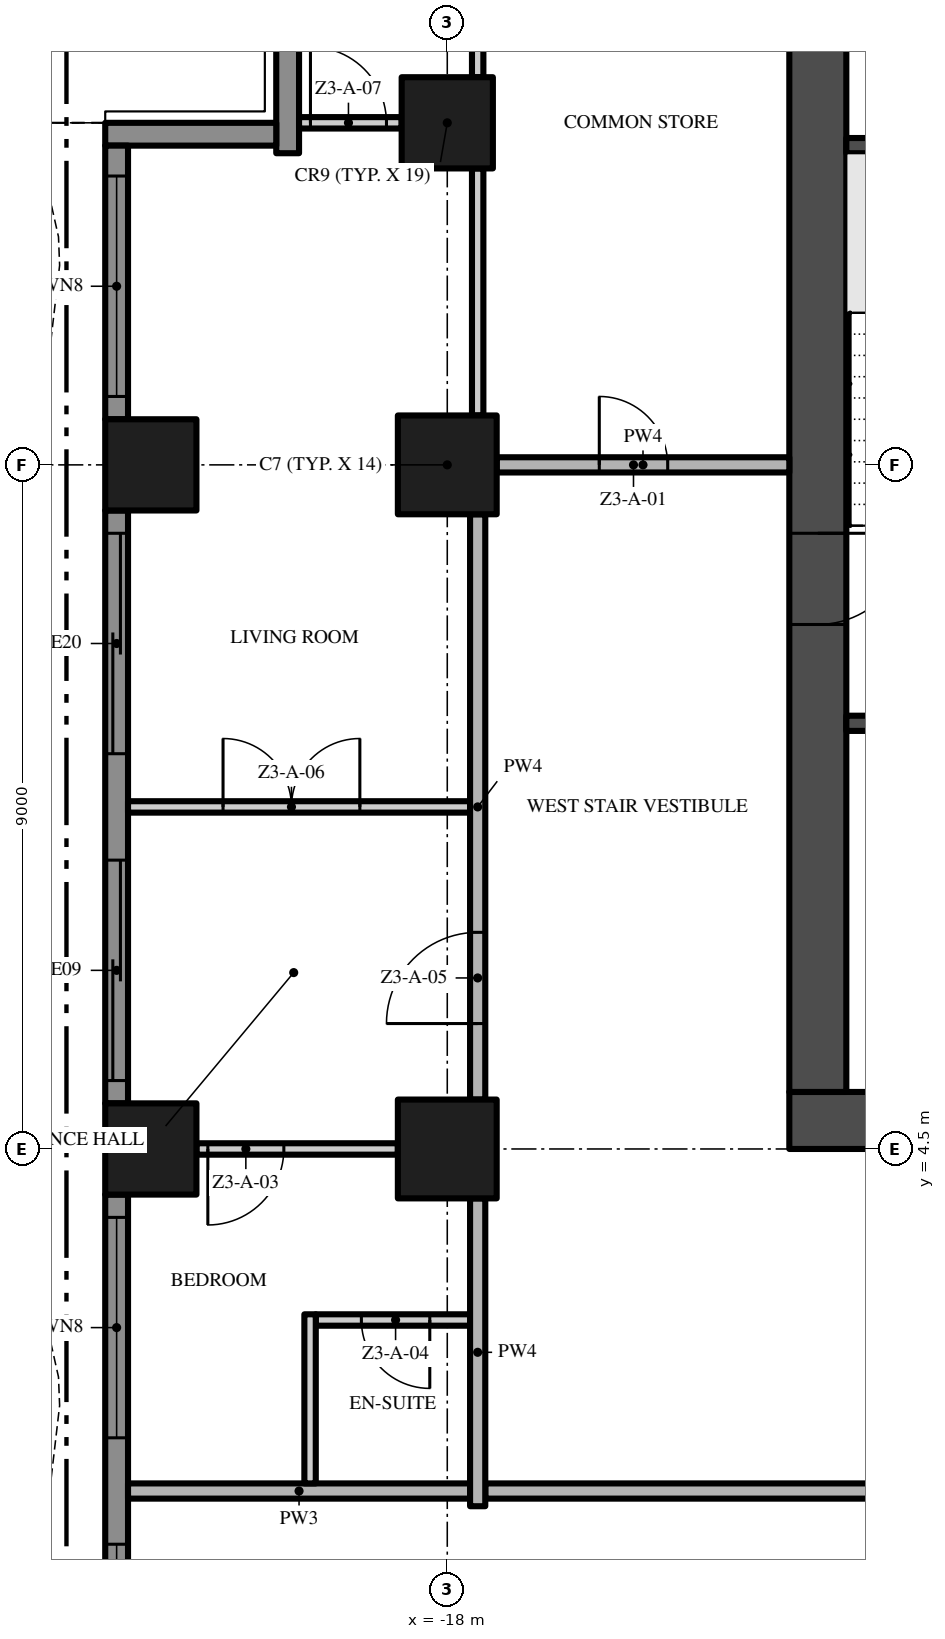
"""IFC4 building model, lengths in metres.
Left out: names, types, materials, properties, quantities, classifications, styles, units other than length and angle.
Written with IfcOpenShell. Run it as: python <this file> out.ifc"""

import sys

from ifc_helpers import new_model, si_unit, direction, frame, frame_2d, origin, origin_2d, place, context, subcontext, project, spatial, polyline, rectangle, outline, extrude, element, fill, save


model = new_model("IFC4")
c1 = context("Model", 3, precision=1e-05, world=origin(), true_north=direction((0.0, 1.0)))
c2 = subcontext(c1, "Body", "Model", "MODEL_VIEW")
j1 = project(units=[si_unit("LENGTHUNIT", "METRE"), si_unit("PLANEANGLEUNIT", "RADIAN")], contexts=[c1])
p1 = place(None, origin())
s1 = spatial("IfcSite", under=j1, at=p1, CompositionType="ELEMENT")
p2 = place(p1, origin())
s2 = spatial("IfcBuilding", under=s1, at=p2, CompositionType="ELEMENT")
p3 = place(p2, frame((0.0, 0.0, 132.6)))
s3 = spatial("IfcBuildingStorey", under=s2, at=p3, CompositionType="ELEMENT", Elevation=132.6)
p4 = place(p3, frame((-13.5, 4.875, -0.3), z_axis=(0.0, 0.0, 1.0), x_axis=(1.0, 0.0, 0.0)))
e1 = element("IfcWall", 1, at=p4, inside=s3, PredefinedType="SHEAR", context=c2, shape_type="SweptSolid", body=[
    extrude(rectangle(XDim=27.0, YDim=0.75, at=frame_2d((13.5, 0.0))), origin(), (0.0, 0.0, 1.0), 3.8),
])
p5 = place(p4, frame((12.0, 0.0, 0.3)))
e2 = element("IfcOpeningElement", 2, at=p5, cuts=e1, PredefinedType="OPENING", context=c2, shape_type="SweptSolid", body=[
    extrude(rectangle(XDim=3.0, YDim=2.4, at=frame_2d((1.5, 1.2))), frame((0.0, 0.385, 0.0), z_axis=(0.0, -1.0, 0.0), x_axis=(1.0, 0.0, 0.0)), (0.0, 0.0, 1.0), 0.77),
])
p6 = place(p4, frame((4.9, 0.0, 0.3)))
e3 = element("IfcOpeningElement", 3, at=p6, cuts=e1, PredefinedType="OPENING", context=c2, shape_type="SweptSolid", body=[
    extrude(rectangle(XDim=1.2, YDim=2.2, at=frame_2d((0.6, 1.1))), frame((0.0, 0.385, 0.0), z_axis=(0.0, -1.0, 0.0), x_axis=(1.0, 0.0, 0.0)), (0.0, 0.0, 1.0), 0.77),
])
p7 = place(p4, frame((20.75, 0.0, 0.3)))
e4 = element("IfcOpeningElement", 4, at=p7, cuts=e1, PredefinedType="OPENING", context=c2, shape_type="SweptSolid", body=[
    extrude(rectangle(XDim=1.5, YDim=2.2, at=frame_2d((0.75, 1.1))), frame((0.0, 0.385, 0.0), z_axis=(0.0, -1.0, 0.0), x_axis=(1.0, 0.0, 0.0)), (0.0, 0.0, 1.0), 0.77),
])
p8 = place(p4, frame((17.4, 0.0, 0.3)))
e5 = element("IfcOpeningElement", 5, at=p8, cuts=e1, PredefinedType="OPENING", context=c2, shape_type="SweptSolid", body=[
    extrude(rectangle(XDim=1.2, YDim=2.2, at=frame_2d((0.6, 1.1))), frame((0.0, 0.385, 0.0), z_axis=(0.0, -1.0, 0.0), x_axis=(1.0, 0.0, 0.0)), (0.0, 0.0, 1.0), 0.77),
])
p9 = place(p3, frame((-13.125, 21.75, -0.3), z_axis=(0.0, 0.0, 1.0), x_axis=(0.0, -1.0, 0.0)))
e6 = element("IfcWall", 6, at=p9, inside=s3, PredefinedType="SHEAR", context=c2, shape_type="SweptSolid", body=[
    extrude(rectangle(XDim=16.5, YDim=0.75, at=frame_2d((8.25, 0.0))), origin(), (0.0, 0.0, 1.0), 3.8),
])
p10 = place(p9, frame((9.15, 0.0, 0.3)))
e7 = element("IfcOpeningElement", 7, at=p10, cuts=e6, PredefinedType="OPENING", context=c2, shape_type="SweptSolid", body=[
    extrude(rectangle(XDim=1.2, YDim=2.2, at=frame_2d((0.6, 1.1))), frame((0.0, 0.385, 0.0), z_axis=(0.0, -1.0, 0.0), x_axis=(1.0, 0.0, 0.0)), (0.0, 0.0, 1.0), 0.77),
])
for number, where, z_axis, x_axis in (
    (8, (-18.0, 13.5, 0.0), (0.0, 0.0, 1.0), (1.0, 0.0, 0.0)),
    (9, (-18.0, 4.5, 0.0), (0.0, 0.0, 1.0), (1.0, 0.0, 0.0)),
):
    element("IfcColumn", number, at=place(p3, frame(where, z_axis=z_axis, x_axis=x_axis)), inside=s3, PredefinedType="COLUMN", context=c2, shape_type="SweptSolid", body=[
        extrude(rectangle(XDim=1.3, YDim=1.3, at=origin_2d()), origin(), (0.0, 0.0, 1.0), 3.5),
    ])
for number, where, z_axis, x_axis in (
    (10, (-21.9, 13.5, 0.0), (0.0, 0.0, 1.0), (1.0, 0.0, 0.0)),
    (11, (-18.0, 18.0, 0.0), (0.0, 0.0, 1.0), (1.0, 0.0, 0.0)),
    (12, (-21.9, 4.5, 0.0), (0.0, 0.0, 1.0), (1.0, 0.0, 0.0)),
):
    element("IfcColumn", number, at=place(p3, frame(where, z_axis=z_axis, x_axis=x_axis)), inside=s3, PredefinedType="COLUMN", context=c2, shape_type="SweptSolid", body=[
        extrude(rectangle(XDim=1.2, YDim=1.2, at=origin_2d()), origin(), (0.0, 0.0, 1.0), 3.5),
    ])
p11 = place(p3, frame((-20.1, 17.6, 0.0), z_axis=(0.0, 0.0, 1.0), x_axis=(0.0, 1.0, 0.0)))
e13 = element("IfcWall", 13, at=p11, inside=s3, PredefinedType="SOLIDWALL", context=c2, shape_type="SweptSolid", body=[
    extrude(rectangle(XDim=2.35, YDim=0.3, at=frame_2d((1.175, 0.0))), origin(), (0.0, 0.0, 1.0), 3.5),
])
p12 = place(p3, frame((-22.5, 17.85, 0.0), z_axis=(0.0, 0.0, 1.0), x_axis=(1.0, 0.0, 0.0)))
e14 = element("IfcWall", 14, at=p12, inside=s3, PredefinedType="SOLIDWALL", context=c2, shape_type="SweptSolid", body=[
    extrude(rectangle(XDim=2.25, YDim=0.3, at=frame_2d((1.125, 0.0))), origin(), (0.0, 0.0, 1.0), 3.5),
])
p13 = place(p3, frame((-22.35, 14.1, 0.0), z_axis=(0.0, 0.0, 1.0), x_axis=(0.0, 1.0, 0.0)))
e15 = element("IfcWall", 15, at=p13, inside=s3, PredefinedType="SOLIDWALL", context=c2, shape_type="SweptSolid", body=[
    extrude(rectangle(XDim=3.6, YDim=0.3, at=frame_2d((1.8, 0.0))), origin(), (0.0, 0.0, 1.0), 3.5),
])
p14 = place(p13, frame((0.3, 0.0, 0.45)))
e16 = element("IfcOpeningElement", 16, at=p14, cuts=e15, PredefinedType="OPENING", context=c2, shape_type="SweptSolid", body=[
    extrude(rectangle(XDim=2.9, YDim=2.65, at=frame_2d((1.45, 1.325))), frame((0.0, 0.16, 0.0), z_axis=(0.0, -1.0, 0.0), x_axis=(1.0, 0.0, 0.0)), (0.0, 0.0, 1.0), 0.32),
])
p15 = place(p3, frame((-22.35, 5.1, 0.0), z_axis=(0.0, 0.0, 1.0), x_axis=(0.0, 1.0, 0.0)))
e17 = element("IfcWall", 17, at=p15, inside=s3, PredefinedType="SOLIDWALL", context=c2, shape_type="SweptSolid", body=[
    extrude(rectangle(XDim=7.8, YDim=0.3, at=frame_2d((3.9, 0.0))), origin(), (0.0, 0.0, 1.0), 3.5),
])
p16 = place(p15, frame((4.6, 0.0, 0.0)))
e18 = element("IfcOpeningElement", 18, at=p16, cuts=e17, PredefinedType="OPENING", context=c2, shape_type="SweptSolid", body=[
    extrude(rectangle(XDim=2.9, YDim=2.4, at=frame_2d((1.45, 1.2))), frame((0.0, 0.16, 0.0), z_axis=(0.0, -1.0, 0.0), x_axis=(1.0, 0.0, 0.0)), (0.0, 0.0, 1.0), 0.32),
])
p17 = place(p15, frame((0.3, 0.0, 0.0)))
e19 = element("IfcOpeningElement", 19, at=p17, cuts=e17, PredefinedType="OPENING", context=c2, shape_type="SweptSolid", body=[
    extrude(rectangle(XDim=2.9, YDim=2.4, at=frame_2d((1.45, 1.2))), frame((0.0, 0.16, 0.0), z_axis=(0.0, -1.0, 0.0), x_axis=(1.0, 0.0, 0.0)), (0.0, 0.0, 1.0), 0.32),
])
p18 = place(p3, frame((-22.35, -3.9, 0.0), z_axis=(0.0, 0.0, 1.0), x_axis=(0.0, 1.0, 0.0)))
e20 = element("IfcWall", 20, at=p18, inside=s3, PredefinedType="SOLIDWALL", context=c2, shape_type="SweptSolid", body=[
    extrude(rectangle(XDim=7.8, YDim=0.3, at=frame_2d((3.9, 0.0))), origin(), (0.0, 0.0, 1.0), 3.5),
])
p19 = place(p18, frame((4.6, 0.0, 0.45)))
e21 = element("IfcOpeningElement", 21, at=p19, cuts=e20, PredefinedType="OPENING", context=c2, shape_type="SweptSolid", body=[
    extrude(rectangle(XDim=2.9, YDim=2.65, at=frame_2d((1.45, 1.325))), frame((0.0, 0.16, 0.0), z_axis=(0.0, -1.0, 0.0), x_axis=(1.0, 0.0, 0.0)), (0.0, 0.0, 1.0), 0.32),
])
p20 = place(p18, frame((0.3, 0.0, 0.45)))
e22 = element("IfcOpeningElement", 22, at=p20, cuts=e20, PredefinedType="OPENING", context=c2, shape_type="SweptSolid", body=[
    extrude(rectangle(XDim=2.9, YDim=2.65, at=frame_2d((1.45, 1.325))), frame((0.0, 0.16, 0.0), z_axis=(0.0, -1.0, 0.0), x_axis=(1.0, 0.0, 0.0)), (0.0, 0.0, 1.0), 0.32),
])
p21 = place(p3, origin())
e23 = element("IfcWall", 23, at=p21, inside=s3, PredefinedType="USERDEFINED", context=c2, shape_type="SweptSolid", body=[
    extrude(outline(polyline([(-23.451, 18.0), (-23.115, 16.5), (-23.1, 16.125), (-23.231, 15.0), (-23.755, 13.5), (-24.488, 12.0), (-25.149, 10.5), (-25.485, 9.0), (-25.5, 8.625), (-25.369, 7.5), (-24.845, 6.0), (-24.112, 4.5), (-23.451, 3.0), (-23.115, 1.5), (-23.1, 1.125), (-23.231, 0.0), (-23.755, -1.5), (-24.488, -3.0), (-25.149, -4.5), (-25.485, -6.0), (-25.5, -6.375), (-25.369, -7.5), (-24.845, -9.0), (-24.112, -10.5), (-23.451, -12.0), (-23.115, -13.5), (-22.871, -13.445), (-23.213, -11.921), (-23.885, -10.395), (-24.614, -8.904), (-25.124, -7.444), (-25.249, -6.365), (-25.236, -6.033), (-24.91, -4.579), (-24.261, -3.105), (-23.524, -1.596), (-22.986, -0.056), (-22.849, 1.115), (-22.866, 1.533), (-23.213, 3.079), (-23.885, 4.605), (-24.614, 6.096), (-25.124, 7.556), (-25.249, 8.635), (-25.236, 8.967), (-24.91, 10.421), (-24.261, 11.895), (-23.524, 13.404), (-22.986, 14.944), (-22.849, 16.115), (-22.866, 16.533), (-23.208, 18.055), (-23.451, 18.0)])), origin(), (0.0, 0.0, 1.0), 0.9),
])
for number, where, z_axis, x_axis in (
    (24, (-12.75, 10.1, 0.0), (0.0, 0.0, 1.0), (1.0, 0.0, 0.0)),
    (25, (-12.75, 17.7, 0.0), (0.0, 0.0, 1.0), (1.0, 0.0, 0.0)),
):
    element("IfcWall", number, at=place(p3, frame(where, z_axis=z_axis, x_axis=x_axis)), inside=s3, PredefinedType="SHEAR", context=c2, shape_type="SweptSolid", body=[
        extrude(rectangle(XDim=3.1, YDim=0.2, at=frame_2d((1.55, 0.0))), origin(), (0.0, 0.0, 1.0), 3.5),
    ])
p22 = place(p3, frame((17.5, 0.0, 0.0), z_axis=(0.0, 0.0, 1.0), x_axis=(-1.0, 0.0, 0.0)))
e26 = element("IfcWall", 26, at=p22, inside=s3, PredefinedType="PARTITIONING", context=c2, shape_type="SweptSolid", body=[
    extrude(rectangle(XDim=35.0, YDim=0.2, at=frame_2d((17.5, 0.0))), origin(), (0.0, 0.0, 1.0), 3.5),
])
p23 = place(p22, frame((16.75, 0.0, 0.0)))
e27 = element("IfcOpeningElement", 27, at=p23, cuts=e26, PredefinedType="OPENING", context=c2, shape_type="SweptSolid", body=[
    extrude(rectangle(XDim=1.5, YDim=2.4, at=frame_2d((0.75, 1.2))), frame((0.0, 0.11, 0.0), z_axis=(0.0, -1.0, 0.0), x_axis=(1.0, 0.0, 0.0)), (0.0, 0.0, 1.0), 0.22),
])
p24 = place(p3, frame((-22.2, 0.0, 0.0), z_axis=(0.0, 0.0, 1.0), x_axis=(1.0, 0.0, 0.0)))
e28 = element("IfcWall", 28, at=p24, inside=s3, PredefinedType="PARTITIONING", context=c2, shape_type="SweptSolid", body=[
    extrude(rectangle(XDim=4.5, YDim=0.2, at=frame_2d((2.25, 0.0))), origin(), (0.0, 0.0, 1.0), 3.5),
])
p25 = place(p3, frame((-17.7, 2.25, 0.0), z_axis=(0.0, 0.0, 1.0), x_axis=(-1.0, 0.0, 0.0)))
e29 = element("IfcWall", 29, at=p25, inside=s3, PredefinedType="PARTITIONING", context=c2, shape_type="SweptSolid", body=[
    extrude(rectangle(XDim=2.03, YDim=0.15, at=frame_2d((1.015, 0.0))), origin(), (0.0, 0.0, 1.0), 3.5),
])
p26 = place(p25, frame((0.53, 0.0, 0.0)))
e30 = element("IfcOpeningElement", 30, at=p26, cuts=e29, PredefinedType="OPENING", context=c2, shape_type="SweptSolid", body=[
    extrude(rectangle(XDim=0.9, YDim=2.1, at=frame_2d((0.45, 1.05))), frame((0.0, 0.085, 0.0), z_axis=(0.0, -1.0, 0.0), x_axis=(1.0, 0.0, 0.0)), (0.0, 0.0, 1.0), 0.17),
])
p27 = place(p3, frame((-18.65, 4.5, 0.0), z_axis=(0.0, 0.0, 1.0), x_axis=(-1.0, 0.0, 0.0)))
e31 = element("IfcWall", 31, at=p27, inside=s3, PredefinedType="PARTITIONING", context=c2, shape_type="SweptSolid", body=[
    extrude(rectangle(XDim=2.65, YDim=0.15, at=frame_2d((1.325, 0.0))), origin(), (0.0, 0.0, 1.0), 3.5),
])
p28 = place(p27, frame((1.5, 0.0, 0.0)))
e32 = element("IfcOpeningElement", 32, at=p28, cuts=e31, PredefinedType="OPENING", context=c2, shape_type="SweptSolid", body=[
    extrude(rectangle(XDim=1.0, YDim=2.4, at=frame_2d((0.5, 1.2))), frame((0.0, 0.085, 0.0), z_axis=(0.0, -1.0, 0.0), x_axis=(1.0, 0.0, 0.0)), (0.0, 0.0, 1.0), 0.17),
])
p29 = place(p3, frame((-22.2, 9.0, 0.0), z_axis=(0.0, 0.0, 1.0), x_axis=(1.0, 0.0, 0.0)))
e33 = element("IfcWall", 33, at=p29, inside=s3, PredefinedType="PARTITIONING", context=c2, shape_type="SweptSolid", body=[
    extrude(rectangle(XDim=4.5, YDim=0.15, at=frame_2d((2.25, 0.0))), origin(), (0.0, 0.0, 1.0), 3.5),
])
p30 = place(p29, frame((1.25, 0.0, 0.0)))
e34 = element("IfcOpeningElement", 34, at=p30, cuts=e33, PredefinedType="OPENING", context=c2, shape_type="SweptSolid", body=[
    extrude(rectangle(XDim=1.8, YDim=2.4, at=frame_2d((0.9, 1.2))), frame((0.0, 0.085, 0.0), z_axis=(0.0, -1.0, 0.0), x_axis=(1.0, 0.0, 0.0)), (0.0, 0.0, 1.0), 0.17),
])
p31 = place(p3, frame((-17.35, 13.5, 0.0), z_axis=(0.0, 0.0, 1.0), x_axis=(1.0, 0.0, 0.0)))
e35 = element("IfcWall", 35, at=p31, inside=s3, PredefinedType="PARTITIONING", context=c2, shape_type="SweptSolid", body=[
    extrude(rectangle(XDim=3.85, YDim=0.2, at=frame_2d((1.925, 0.0))), origin(), (0.0, 0.0, 1.0), 3.5),
])
p32 = place(p31, frame((1.35, 0.0, 0.0)))
e36 = element("IfcOpeningElement", 36, at=p32, cuts=e35, PredefinedType="OPENING", context=c2, shape_type="SweptSolid", body=[
    extrude(rectangle(XDim=0.9, YDim=2.1, at=frame_2d((0.45, 1.05))), frame((0.0, 0.11, 0.0), z_axis=(0.0, -1.0, 0.0), x_axis=(1.0, 0.0, 0.0)), (0.0, 0.0, 1.0), 0.22),
])
p33 = place(p3, frame((-19.95, 18.0, 0.0), z_axis=(0.0, 0.0, 1.0), x_axis=(1.0, 0.0, 0.0)))
e37 = element("IfcWall", 37, at=p33, inside=s3, PredefinedType="PARTITIONING", context=c2, shape_type="SweptSolid", body=[
    extrude(rectangle(XDim=1.35, YDim=0.15, at=frame_2d((0.675, 0.0))), origin(), (0.0, 0.0, 1.0), 3.5),
])
p34 = place(p33, frame((0.15, 0.0, 0.0)))
e38 = element("IfcOpeningElement", 38, at=p34, cuts=e37, PredefinedType="OPENING", context=c2, shape_type="SweptSolid", body=[
    extrude(rectangle(XDim=1.0, YDim=2.4, at=frame_2d((0.5, 1.2))), frame((0.0, 0.085, 0.0), z_axis=(0.0, -1.0, 0.0), x_axis=(1.0, 0.0, 0.0)), (0.0, 0.0, 1.0), 0.17),
])
p35 = place(p3, frame((-19.805, 0.1, 0.0), z_axis=(0.0, 0.0, 1.0), x_axis=(0.0, 1.0, 0.0)))
e39 = element("IfcWall", 39, at=p35, inside=s3, PredefinedType="PARTITIONING", context=c2, shape_type="SweptSolid", body=[
    extrude(rectangle(XDim=2.225, YDim=0.15, at=frame_2d((1.113, 0.0))), origin(), (0.0, 0.0, 1.0), 3.5),
])
p36 = place(p3, frame((-17.6, -0.2, 0.0), z_axis=(0.0, 0.0, 1.0), x_axis=(0.0, 1.0, 0.0)))
e40 = element("IfcWall", 40, at=p36, inside=s3, PredefinedType="PARTITIONING", context=c2, shape_type="SweptSolid", body=[
    extrude(rectangle(XDim=4.05, YDim=0.2, at=frame_2d((2.025, 0.0))), origin(), (0.0, 0.0, 1.0), 3.5),
])
p37 = place(p3, frame((-17.6, 5.15, 0.0), z_axis=(0.0, 0.0, 1.0), x_axis=(0.0, 1.0, 0.0)))
e41 = element("IfcWall", 41, at=p37, inside=s3, PredefinedType="PARTITIONING", context=c2, shape_type="SweptSolid", body=[
    extrude(rectangle(XDim=7.7, YDim=0.2, at=frame_2d((3.85, 0.0))), origin(), (0.0, 0.0, 1.0), 3.5),
])
p38 = place(p37, frame((1.0, 0.0, 0.0)))
e42 = element("IfcOpeningElement", 42, at=p38, cuts=e41, PredefinedType="OPENING", context=c2, shape_type="SweptSolid", body=[
    extrude(rectangle(XDim=1.2, YDim=2.4, at=frame_2d((0.6, 1.2))), frame((0.0, 0.11, 0.0), z_axis=(0.0, -1.0, 0.0), x_axis=(1.0, 0.0, 0.0)), (0.0, 0.0, 1.0), 0.22),
])
p39 = place(p3, frame((-17.6, 14.15, 0.0), z_axis=(0.0, 0.0, 1.0), x_axis=(0.0, 1.0, 0.0)))
e43 = element("IfcWall", 43, at=p39, inside=s3, PredefinedType="PARTITIONING", context=c2, shape_type="SweptSolid", body=[
    extrude(rectangle(XDim=3.25, YDim=0.15, at=frame_2d((1.625, 0.0))), origin(), (0.0, 0.0, 1.0), 3.5),
])
p40 = place(p3, frame((-17.6, 18.6, 0.0), z_axis=(0.0, 0.0, 1.0), x_axis=(0.0, 1.0, 0.0)))
e44 = element("IfcWall", 44, at=p40, inside=s3, PredefinedType="PARTITIONING", context=c2, shape_type="SweptSolid", body=[
    extrude(rectangle(XDim=2.7, YDim=0.15, at=frame_2d((1.35, 0.0))), origin(), (0.0, 0.0, 1.0), 3.5),
])
p41 = place(p14, origin())
e45 = element("IfcWindow", 45, at=p41, inside=s3, PartitioningType="SINGLE_PANEL", PredefinedType="WINDOW", context=c2, shape_type="SweptSolid", body=[
    extrude(rectangle(XDim=2.9, YDim=2.65, at=frame_2d((1.45, 1.325))), frame((0.0, 0.03, 0.0), z_axis=(0.0, -1.0, 0.0), x_axis=(1.0, 0.0, 0.0)), (0.0, 0.0, 1.0), 0.06),
])
fill(e16, e45)
p42 = place(p16, origin())
e46 = element("IfcDoor", 46, at=p42, inside=s3, OperationType="SINGLE_SWING_LEFT", PredefinedType="DOOR", context=c2, shape_type="SweptSolid", body=[
    extrude(rectangle(XDim=2.9, YDim=2.4, at=frame_2d((1.45, 1.2))), frame((0.0, 0.025, 0.0), z_axis=(0.0, -1.0, 0.0), x_axis=(1.0, 0.0, 0.0)), (0.0, 0.0, 1.0), 0.05),
])
fill(e18, e46)
p43 = place(p17, origin())
e47 = element("IfcDoor", 47, at=p43, inside=s3, OperationType="SINGLE_SWING_LEFT", PredefinedType="DOOR", context=c2, shape_type="SweptSolid", body=[
    extrude(rectangle(XDim=2.9, YDim=2.4, at=frame_2d((1.45, 1.2))), frame((0.0, 0.025, 0.0), z_axis=(0.0, -1.0, 0.0), x_axis=(1.0, 0.0, 0.0)), (0.0, 0.0, 1.0), 0.05),
])
fill(e19, e47)
p44 = place(p19, origin())
e48 = element("IfcWindow", 48, at=p44, inside=s3, PartitioningType="SINGLE_PANEL", PredefinedType="WINDOW", context=c2, shape_type="SweptSolid", body=[
    extrude(rectangle(XDim=2.9, YDim=2.65, at=frame_2d((1.45, 1.325))), frame((0.0, 0.03, 0.0), z_axis=(0.0, -1.0, 0.0), x_axis=(1.0, 0.0, 0.0)), (0.0, 0.0, 1.0), 0.06),
])
fill(e21, e48)
p45 = place(p20, origin())
e49 = element("IfcWindow", 49, at=p45, inside=s3, PartitioningType="SINGLE_PANEL", PredefinedType="WINDOW", context=c2, shape_type="SweptSolid", body=[
    extrude(rectangle(XDim=2.9, YDim=2.65, at=frame_2d((1.45, 1.325))), frame((0.0, 0.03, 0.0), z_axis=(0.0, -1.0, 0.0), x_axis=(1.0, 0.0, 0.0)), (0.0, 0.0, 1.0), 0.06),
])
fill(e22, e49)
p46 = place(p10, frame((1.2, 0.0, 0.0), z_axis=(0.0, 0.0, 1.0), x_axis=(-1.0, 0.0, 0.0)))
e50 = element("IfcDoor", 50, at=p46, inside=s3, OperationType="SINGLE_SWING_RIGHT", PredefinedType="DOOR", context=c2, shape_type="SweptSolid", body=[
    extrude(rectangle(XDim=1.2, YDim=2.2, at=frame_2d((0.6, 1.1))), frame((0.0, 0.025, 0.0), z_axis=(0.0, -1.0, 0.0), x_axis=(1.0, 0.0, 0.0)), (0.0, 0.0, 1.0), 0.05),
])
fill(e7, e50)
p47 = place(p32, origin())
e51 = element("IfcDoor", 51, at=p47, inside=s3, OperationType="SINGLE_SWING_LEFT", PredefinedType="DOOR", context=c2, shape_type="SweptSolid", body=[
    extrude(rectangle(XDim=0.9, YDim=2.1, at=frame_2d((0.45, 1.05))), frame((0.0, 0.025, 0.0), z_axis=(0.0, -1.0, 0.0), x_axis=(1.0, 0.0, 0.0)), (0.0, 0.0, 1.0), 0.05),
])
fill(e36, e51)
p48 = place(p28, origin())
e52 = element("IfcDoor", 52, at=p48, inside=s3, OperationType="SINGLE_SWING_RIGHT", PredefinedType="DOOR", context=c2, shape_type="SweptSolid", body=[
    extrude(rectangle(XDim=1.0, YDim=2.4, at=frame_2d((0.5, 1.2))), frame((0.0, 0.025, 0.0), z_axis=(0.0, -1.0, 0.0), x_axis=(1.0, 0.0, 0.0)), (0.0, 0.0, 1.0), 0.05),
])
fill(e32, e52)
p49 = place(p26, origin())
e53 = element("IfcDoor", 53, at=p49, inside=s3, OperationType="SINGLE_SWING_LEFT", PredefinedType="DOOR", context=c2, shape_type="SweptSolid", body=[
    extrude(rectangle(XDim=0.9, YDim=2.1, at=frame_2d((0.45, 1.05))), frame((0.0, 0.025, 0.0), z_axis=(0.0, -1.0, 0.0), x_axis=(1.0, 0.0, 0.0)), (0.0, 0.0, 1.0), 0.05),
])
fill(e30, e53)
p50 = place(p38, origin())
e54 = element("IfcDoor", 54, at=p50, inside=s3, OperationType="SINGLE_SWING_LEFT", PredefinedType="DOOR", context=c2, shape_type="SweptSolid", body=[
    extrude(rectangle(XDim=1.2, YDim=2.4, at=frame_2d((0.6, 1.2))), frame((0.0, 0.025, 0.0), z_axis=(0.0, -1.0, 0.0), x_axis=(1.0, 0.0, 0.0)), (0.0, 0.0, 1.0), 0.05),
])
fill(e42, e54)
p51 = place(p30, origin())
e55 = element("IfcDoor", 55, at=p51, inside=s3, OperationType="DOUBLE_DOOR_SINGLE_SWING", PredefinedType="DOOR", context=c2, shape_type="SweptSolid", body=[
    extrude(rectangle(XDim=1.8, YDim=2.4, at=frame_2d((0.9, 1.2))), frame((0.0, 0.025, 0.0), z_axis=(0.0, -1.0, 0.0), x_axis=(1.0, 0.0, 0.0)), (0.0, 0.0, 1.0), 0.05),
])
fill(e34, e55)
p52 = place(p34, origin())
e56 = element("IfcDoor", 56, at=p52, inside=s3, OperationType="SINGLE_SWING_LEFT", PredefinedType="DOOR", context=c2, shape_type="SweptSolid", body=[
    extrude(rectangle(XDim=1.0, YDim=2.4, at=frame_2d((0.5, 1.2))), frame((0.0, 0.025, 0.0), z_axis=(0.0, -1.0, 0.0), x_axis=(1.0, 0.0, 0.0)), (0.0, 0.0, 1.0), 0.05),
])
fill(e38, e56)
save(model, sys.argv[1])
